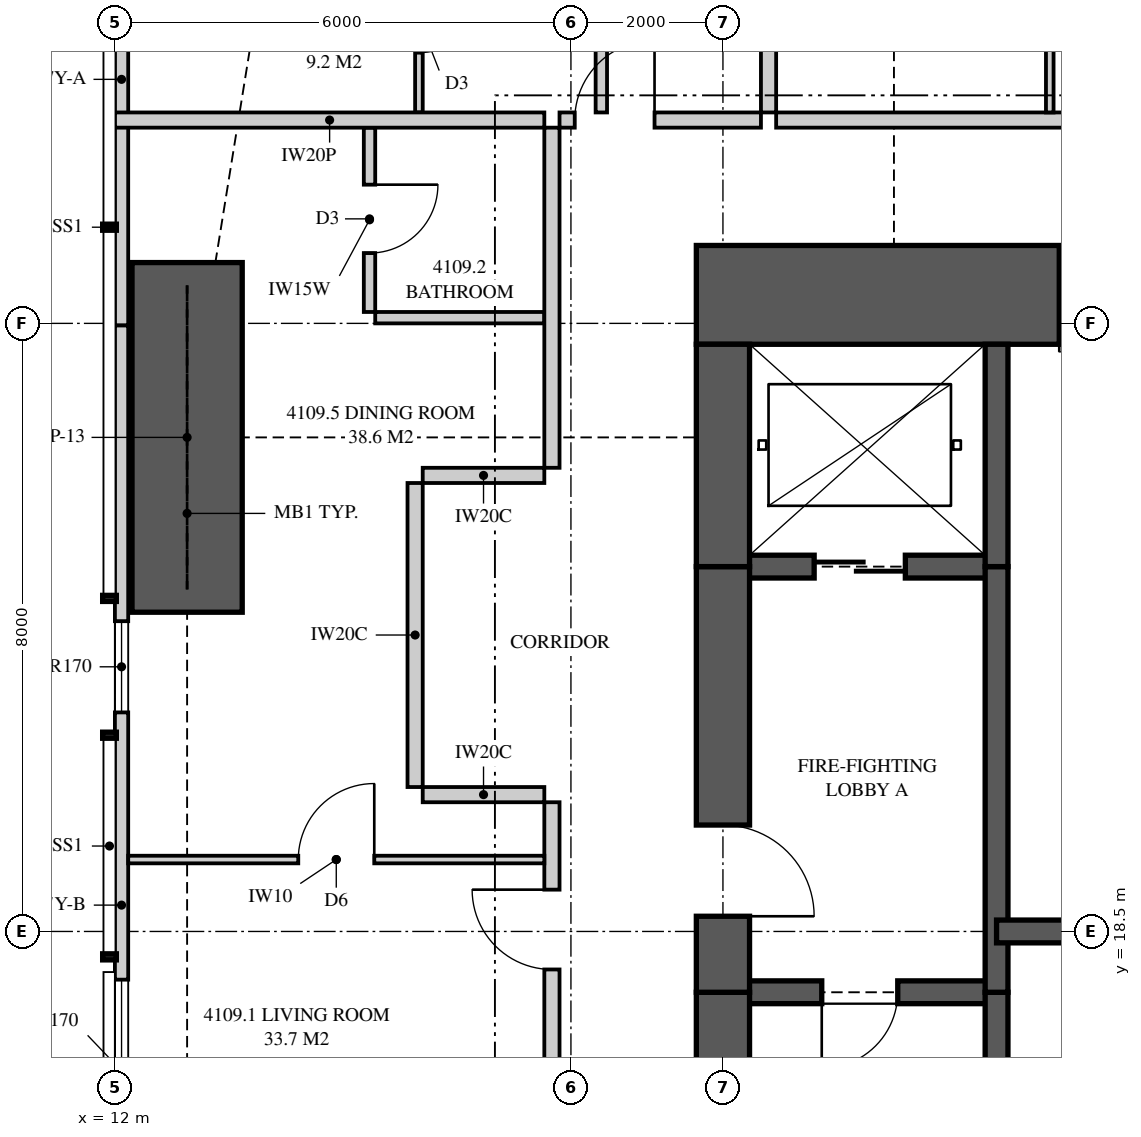
"""IFC4 building model, lengths in metres.
Left out: names, types, materials, properties, quantities, classifications, styles, units other than length and angle.
Written with IfcOpenShell. Run it as: python <this file> out.ifc"""

import sys

from ifc_helpers import new_model, si_unit, direction, frame, frame_2d, origin, place, context, subcontext, project, spatial, polyline, rectangle, outline, extrude, element, fill, save


model = new_model("IFC4")
c1 = context("Model", 3, precision=1e-05, world=origin(), true_north=direction((0.0, 1.0)))
c2 = subcontext(c1, "Body", "Model", "MODEL_VIEW")
j1 = project(units=[si_unit("LENGTHUNIT", "METRE"), si_unit("PLANEANGLEUNIT", "RADIAN")], contexts=[c1])
p1 = place(None, origin())
s1 = spatial("IfcSite", under=j1, at=p1, CompositionType="ELEMENT")
p2 = place(p1, origin())
s2 = spatial("IfcBuilding", under=s1, at=p2, CompositionType="ELEMENT")
p3 = place(p2, frame((0.0, 0.0, 154.35)))
s3 = spatial("IfcBuildingStorey", under=s2, at=p3, CompositionType="ELEMENT", Elevation=154.35)
p4 = place(p3, frame((26.0, 26.875, 0.0), z_axis=(0.0, 0.0, 1.0), x_axis=(-1.0, 0.0, 0.0)))
e1 = element("IfcWall", 1, at=p4, inside=s3, PredefinedType="SHEAR", context=c2, shape_type="SweptSolid", body=[
    extrude(rectangle(XDim=6.35, YDim=1.3, at=frame_2d((3.175, 0.0))), origin(), (0.0, 0.0, 1.0), 3.35),
])
p5 = place(p4, frame((0.825, 0.0, 0.0)))
e2 = element("IfcOpeningElement", 2, at=p5, cuts=e1, PredefinedType="OPENING", context=c2, shape_type="SweptSolid", body=[
    extrude(rectangle(XDim=0.75, YDim=2.1, at=frame_2d((0.375, 1.05))), frame((0.0, 0.66, 0.0), z_axis=(0.0, -1.0, 0.0), x_axis=(1.0, 0.0, 0.0)), (0.0, 0.0, 1.0), 1.32),
])
p6 = place(p3, frame((20.0, 26.225, 0.0), z_axis=(0.0, 0.0, 1.0), x_axis=(0.0, -1.0, 0.0)))
e3 = element("IfcWall", 3, at=p6, inside=s3, PredefinedType="SHEAR", context=c2, shape_type="SweptSolid", body=[
    extrude(rectangle(XDim=2.925, YDim=0.7, at=frame_2d((1.462, 0.0))), origin(), (0.0, 0.0, 1.0), 3.35),
])
p7 = place(p3, frame((20.0, 23.3, 0.0), z_axis=(0.0, 0.0, 1.0), x_axis=(0.0, -1.0, 0.0)))
e4 = element("IfcWall", 4, at=p7, inside=s3, PredefinedType="SHEAR", context=c2, shape_type="SweptSolid", body=[
    extrude(rectangle(XDim=5.6, YDim=0.7, at=frame_2d((2.8, 0.0))), origin(), (0.0, 0.0, 1.0), 3.35),
])
p8 = place(p7, frame((3.4, 0.0, 0.0)))
e5 = element("IfcOpeningElement", 5, at=p8, cuts=e4, PredefinedType="OPENING", context=c2, shape_type="SweptSolid", body=[
    extrude(rectangle(XDim=1.2, YDim=2.2, at=frame_2d((0.6, 1.1))), frame((0.0, 0.36, 0.0), z_axis=(0.0, -1.0, 0.0), x_axis=(1.0, 0.0, 0.0)), (0.0, 0.0, 1.0), 0.72),
])
p9 = place(p3, frame((20.0, 17.7, 0.0), z_axis=(0.0, 0.0, 1.0), x_axis=(0.0, -1.0, 0.0)))
e6 = element("IfcWall", 6, at=p9, inside=s3, PredefinedType="SHEAR", context=c2, shape_type="SweptSolid", body=[
    extrude(rectangle(XDim=4.7, YDim=0.7, at=frame_2d((2.35, 0.0))), origin(), (0.0, 0.0, 1.0), 3.35),
])
p10 = place(p3, frame((23.6, 10.775, 0.0), z_axis=(0.0, 0.0, 1.0), x_axis=(0.0, 1.0, 0.0)))
e7 = element("IfcWall", 7, at=p10, inside=s3, PredefinedType="SHEAR", context=c2, shape_type="SweptSolid", body=[
    extrude(rectangle(XDim=6.925, YDim=0.3, at=frame_2d((3.462, 0.0))), origin(), (0.0, 0.0, 1.0), 3.35),
])
p11 = place(p3, frame((23.6, 17.7, 0.0), z_axis=(0.0, 0.0, 1.0), x_axis=(0.0, 1.0, 0.0)))
e8 = element("IfcWall", 8, at=p11, inside=s3, PredefinedType="SHEAR", context=c2, shape_type="SweptSolid", body=[
    extrude(rectangle(XDim=5.6, YDim=0.3, at=frame_2d((2.8, 0.0))), origin(), (0.0, 0.0, 1.0), 3.35),
])
p12 = place(p3, frame((23.6, 23.3, 0.0), z_axis=(0.0, 0.0, 1.0), x_axis=(0.0, 1.0, 0.0)))
e9 = element("IfcWall", 9, at=p12, inside=s3, PredefinedType="SHEAR", context=c2, shape_type="SweptSolid", body=[
    extrude(rectangle(XDim=2.925, YDim=0.3, at=frame_2d((1.462, 0.0))), origin(), (0.0, 0.0, 1.0), 3.35),
])
p13 = place(p3, frame((20.0, 17.7, 0.0), z_axis=(0.0, 0.0, 1.0), x_axis=(1.0, 0.0, 0.0)))
e10 = element("IfcWall", 10, at=p13, inside=s3, PredefinedType="SHEAR", context=c2, shape_type="SweptSolid", body=[
    extrude(rectangle(XDim=3.6, YDim=0.3, at=frame_2d((1.8, 0.0))), origin(), (0.0, 0.0, 1.0), 3.35),
])
p14 = place(p13, frame((1.3, 0.0, 0.0)))
e11 = element("IfcOpeningElement", 11, at=p14, cuts=e10, PredefinedType="OPENING", context=c2, shape_type="SweptSolid", body=[
    extrude(rectangle(XDim=1.0, YDim=2.1, at=frame_2d((0.5, 1.05))), frame((0.0, 0.16, 0.0), z_axis=(0.0, -1.0, 0.0), x_axis=(1.0, 0.0, 0.0)), (0.0, 0.0, 1.0), 0.32),
])
p15 = place(p3, frame((20.0, 23.3, 0.0), z_axis=(0.0, 0.0, 1.0), x_axis=(1.0, 0.0, 0.0)))
e12 = element("IfcWall", 12, at=p15, inside=s3, PredefinedType="SHEAR", context=c2, shape_type="SweptSolid", body=[
    extrude(rectangle(XDim=3.6, YDim=0.3, at=frame_2d((1.8, 0.0))), origin(), (0.0, 0.0, 1.0), 3.35),
])
p16 = place(p15, frame((1.2, 0.0, 0.0)))
e13 = element("IfcOpeningElement", 13, at=p16, cuts=e12, PredefinedType="OPENING", context=c2, shape_type="SweptSolid", body=[
    extrude(rectangle(XDim=1.2, YDim=2.1, at=frame_2d((0.6, 1.05))), frame((0.0, 0.16, 0.0), z_axis=(0.0, -1.0, 0.0), x_axis=(1.0, 0.0, 0.0)), (0.0, 0.0, 1.0), 0.32),
])
p17 = place(p3, frame((23.6, 18.5, 0.0), z_axis=(0.0, 0.0, 1.0), x_axis=(1.0, 0.0, 0.0)))
e14 = element("IfcWall", 14, at=p17, inside=s3, PredefinedType="SHEAR", context=c2, shape_type="SweptSolid", body=[
    extrude(rectangle(XDim=2.4, YDim=0.3, at=frame_2d((1.2, 0.0))), origin(), (0.0, 0.0, 1.0), 3.35),
])
p18 = place(p3, frame((12.087, 32.949, 0.0), z_axis=(0.0, 0.0, 1.0), x_axis=(0.0, -1.0, 0.0)))
e15 = element("IfcWall", 15, at=p18, inside=s3, PredefinedType="SOLIDWALL", context=c2, shape_type="SweptSolid", body=[
    extrude(rectangle(XDim=6.477, YDim=0.175, at=frame_2d((3.238, 0.0))), origin(), (0.0, 0.0, 1.0), 3.11),
])
p19 = place(p3, frame((12.087, 26.472, 0.0), z_axis=(0.0, 0.0, 1.0), x_axis=(0.0, -1.0, 0.0)))
e16 = element("IfcWall", 16, at=p19, inside=s3, PredefinedType="SOLIDWALL", context=c2, shape_type="SweptSolid", body=[
    extrude(outline(polyline([(15.251, 2.15), (0.0, 2.15), (0.0, 0.0), (0.762, 0.0), (0.762, 0.079), (2.182, 0.079), (2.182, 0.0), (12.762, 0.0), (12.762, 0.079), (14.182, 0.079), (14.182, 0.0), (15.251, 0.0), (15.251, 2.15)])), frame((0.0, 0.087, 0.0), z_axis=(0.0, -1.0, 0.0), x_axis=(1.0, 0.0, 0.0)), (0.0, 0.0, 1.0), 0.175),
])
p20 = place(p19, frame((3.89, 0.0, 0.4)))
e17 = element("IfcOpeningElement", 17, at=p20, cuts=e16, PredefinedType="OPENING", context=c2, shape_type="SweptSolid", body=[
    extrude(rectangle(XDim=1.2, YDim=1.7, at=frame_2d((0.6, 0.85))), frame((0.0, 0.097, 0.0), z_axis=(0.0, -1.0, 0.0), x_axis=(1.0, 0.0, 0.0)), (0.0, 0.0, 1.0), 0.195),
])
p21 = place(p19, frame((8.606, 0.0, 0.4)))
e18 = element("IfcOpeningElement", 18, at=p21, cuts=e16, PredefinedType="OPENING", context=c2, shape_type="SweptSolid", body=[
    extrude(rectangle(XDim=2.4, YDim=1.7, at=frame_2d((1.2, 0.85))), frame((0.0, 0.097, 0.0), z_axis=(0.0, -1.0, 0.0), x_axis=(1.0, 0.0, 0.0)), (0.0, 0.0, 1.0), 0.195),
])
p22 = place(p3, frame((20.6, 35.825, 0.0), z_axis=(0.0, 0.0, 1.0), x_axis=(0.0, -1.0, 0.0)))
e19 = element("IfcWall", 19, at=p22, inside=s3, PredefinedType="PARTITIONING", context=c2, shape_type="SweptSolid", body=[
    extrude(outline(polyline([(0.529, 2.15), (0.0, 2.15), (0.0, 0.0), (0.529, 0.0), (0.529, 0.038), (1.021, 0.038), (1.021, 0.0), (6.55, 0.0), (6.55, 3.11), (2.194, 3.11), (2.194, 2.15), (1.021, 2.15), (1.021, 1.961), (0.529, 1.961), (0.529, 2.15)])), frame((0.0, 0.1, 0.0), z_axis=(0.0, -1.0, 0.0), x_axis=(1.0, 0.0, 0.0)), (0.0, 0.0, 1.0), 0.2),
])
p23 = place(p3, frame((17.85, 29.175, 0.0), z_axis=(0.0, 0.0, 1.0), x_axis=(1.0, 0.0, 0.0)))
e20 = element("IfcWall", 20, at=p23, inside=s3, PredefinedType="PARTITIONING", context=c2, shape_type="SweptSolid", body=[
    extrude(rectangle(XDim=2.65, YDim=0.2, at=frame_2d((1.325, 0.0))), origin(), (0.0, 0.0, 1.0), 3.11),
])
p24 = place(p23, frame((0.2, 0.0, 0.0)))
e21 = element("IfcOpeningElement", 21, at=p24, cuts=e20, PredefinedType="OPENING", context=c2, shape_type="SweptSolid", body=[
    extrude(rectangle(XDim=1.05, YDim=2.2, at=frame_2d((0.525, 1.1))), frame((0.0, 0.11, 0.0), z_axis=(0.0, -1.0, 0.0), x_axis=(1.0, 0.0, 0.0)), (0.0, 0.0, 1.0), 0.22),
])
p25 = place(p3, frame((16.0, 31.673, 0.0), z_axis=(0.0, 0.0, 1.0), x_axis=(0.0, -1.0, 0.0)))
e22 = element("IfcWall", 22, at=p25, inside=s3, PredefinedType="PARTITIONING", context=c2, shape_type="SweptSolid", body=[
    extrude(rectangle(XDim=2.398, YDim=0.1, at=frame_2d((1.199, 0.0))), origin(), (0.0, 0.0, 1.0), 3.11),
])
p26 = place(p25, frame((0.712, 0.0, 0.0)))
e23 = element("IfcOpeningElement", 23, at=p26, cuts=e22, PredefinedType="OPENING", context=c2, shape_type="SweptSolid", body=[
    extrude(rectangle(XDim=0.9, YDim=2.1, at=frame_2d((0.45, 1.05))), frame((0.0, 0.06, 0.0), z_axis=(0.0, -1.0, 0.0), x_axis=(1.0, 0.0, 0.0)), (0.0, 0.0, 1.0), 0.12),
])
p27 = place(p3, frame((18.4, 31.673, 0.0), z_axis=(0.0, 0.0, 1.0), x_axis=(0.0, -1.0, 0.0)))
e24 = element("IfcWall", 24, at=p27, inside=s3, PredefinedType="PLUMBINGWALL", context=c2, shape_type="SweptSolid", body=[
    extrude(rectangle(XDim=2.398, YDim=0.15, at=frame_2d((1.199, 0.0))), origin(), (0.0, 0.0, 1.0), 3.11),
])
p28 = place(p3, frame((20.7, 29.175, 0.0), z_axis=(0.0, 0.0, 1.0), x_axis=(1.0, 0.0, 0.0)))
e25 = element("IfcWall", 25, at=p28, inside=s3, PredefinedType="PARTITIONING", context=c2, shape_type="SweptSolid", body=[
    extrude(outline(polyline([(0.0, 0.0), (5.3, 0.0), (5.3, 3.11), (1.896, 3.11), (1.896, 2.531), (1.204, 2.531), (1.204, 3.11), (0.0, 3.11), (0.0, 0.0)])), frame((0.0, 0.1, 0.0), z_axis=(0.0, -1.0, 0.0), x_axis=(1.0, 0.0, 0.0)), (0.0, 0.0, 1.0), 0.2),
])
p29 = place(p3, frame((24.3, 32.225, 0.0), z_axis=(0.0, 0.0, 1.0), x_axis=(0.0, -1.0, 0.0)))
e26 = element("IfcWall", 26, at=p29, inside=s3, PredefinedType="PARTITIONING", context=c2, shape_type="SweptSolid", body=[
    extrude(rectangle(XDim=2.95, YDim=0.1, at=frame_2d((1.475, 0.0))), origin(), (0.0, 0.0, 1.0), 3.11),
])
p30 = place(p3, frame((12.0, 29.175, 0.0), z_axis=(0.0, 0.0, 1.0), x_axis=(1.0, 0.0, 0.0)))
e27 = element("IfcWall", 27, at=p30, inside=s3, PredefinedType="PARTITIONING", context=c2, shape_type="SweptSolid", body=[
    extrude(outline(polyline([(0.0, 0.0), (5.65, 0.0), (5.65, 3.11), (2.749, 3.11), (2.749, 2.15), (0.5, 2.15), (0.5, 3.11), (0.0, 3.11), (0.0, 0.0)])), frame((0.0, 0.1, 0.0), z_axis=(0.0, -1.0, 0.0), x_axis=(1.0, 0.0, 0.0)), (0.0, 0.0, 1.0), 0.2),
])
p31 = place(p3, frame((17.75, 7.925, 0.0), z_axis=(0.0, 0.0, 1.0), x_axis=(0.0, 1.0, 0.0)))
e28 = element("IfcWall", 28, at=p31, inside=s3, PredefinedType="PARTITIONING", context=c2, shape_type="SweptSolid", body=[
    extrude(outline(polyline([(0.0, 0.0), (12.275, 0.0), (12.275, 3.11), (5.421, 3.11), (5.421, 2.531), (4.729, 2.531), (4.729, 3.11), (0.0, 3.11), (0.0, 0.0)])), frame((0.0, 0.1, 0.0), z_axis=(0.0, -1.0, 0.0), x_axis=(1.0, 0.0, 0.0)), (0.0, 0.0, 1.0), 0.2),
])
p32 = place(p31, frame((10.075, 0.0, 0.0)))
e29 = element("IfcOpeningElement", 29, at=p32, cuts=e28, PredefinedType="OPENING", context=c2, shape_type="SweptSolid", body=[
    extrude(rectangle(XDim=1.05, YDim=2.2, at=frame_2d((0.525, 1.1))), frame((0.0, 0.11, 0.0), z_axis=(0.0, -1.0, 0.0), x_axis=(1.0, 0.0, 0.0)), (0.0, 0.0, 1.0), 0.22),
])
p33 = place(p3, frame((15.35, 26.65, 0.0), z_axis=(0.0, 0.0, 1.0), x_axis=(0.0, 1.0, 0.0)))
e30 = element("IfcWall", 30, at=p33, inside=s3, PredefinedType="PLUMBINGWALL", context=c2, shape_type="SweptSolid", body=[
    extrude(rectangle(XDim=2.425, YDim=0.15, at=frame_2d((1.212, 0.0))), origin(), (0.0, 0.0, 1.0), 3.11),
])
p34 = place(p33, frame((0.775, 0.0, 0.0)))
e31 = element("IfcOpeningElement", 31, at=p34, cuts=e30, PredefinedType="OPENING", context=c2, shape_type="SweptSolid", body=[
    extrude(rectangle(XDim=0.9, YDim=2.1, at=frame_2d((0.45, 1.05))), frame((0.0, 0.085, 0.0), z_axis=(0.0, -1.0, 0.0), x_axis=(1.0, 0.0, 0.0)), (0.0, 0.0, 1.0), 0.17),
])
p35 = place(p3, frame((15.425, 26.575, 0.0), z_axis=(0.0, 0.0, 1.0), x_axis=(1.0, 0.0, 0.0)))
e32 = element("IfcWall", 32, at=p35, inside=s3, PredefinedType="PLUMBINGWALL", context=c2, shape_type="SweptSolid", body=[
    extrude(rectangle(XDim=2.225, YDim=0.15, at=frame_2d((1.112, 0.0))), origin(), (0.0, 0.0, 1.0), 3.11),
])
p36 = place(p3, frame((12.175, 19.446, 0.0), z_axis=(0.0, 0.0, 1.0), x_axis=(1.0, 0.0, 0.0)))
e33 = element("IfcWall", 33, at=p36, inside=s3, PredefinedType="PARTITIONING", context=c2, shape_type="SweptSolid", body=[
    extrude(outline(polyline([(0.0, 0.0), (5.475, 0.0), (5.475, 3.11), (1.835, 3.11), (1.835, 2.15), (0.0, 2.15), (0.0, 3.11), (0.0, 0.0)])), frame((0.0, 0.05, 0.0), z_axis=(0.0, -1.0, 0.0), x_axis=(1.0, 0.0, 0.0)), (0.0, 0.0, 1.0), 0.1),
])
p37 = place(p36, frame((2.238, 0.0, 0.0)))
e34 = element("IfcOpeningElement", 34, at=p37, cuts=e33, PredefinedType="OPENING", context=c2, shape_type="SweptSolid", body=[
    extrude(rectangle(XDim=1.0, YDim=2.1, at=frame_2d((0.5, 1.05))), frame((0.0, 0.06, 0.0), z_axis=(0.0, -1.0, 0.0), x_axis=(1.0, 0.0, 0.0)), (0.0, 0.0, 1.0), 0.12),
])
p38 = place(p3, frame((17.75, 24.6, 0.0), z_axis=(0.0, 0.0, 1.0), x_axis=(0.0, 1.0, 0.0)))
e35 = element("IfcWall", 35, at=p38, inside=s3, PredefinedType="PARTITIONING", context=c2, shape_type="SweptSolid", body=[
    extrude(outline(polyline([(0.0, 0.0), (4.475, 0.0), (4.475, 3.11), (0.746, 3.11), (0.746, 2.531), (0.054, 2.531), (0.054, 3.11), (0.0, 3.11), (0.0, 0.0)])), frame((0.0, 0.1, 0.0), z_axis=(0.0, -1.0, 0.0), x_axis=(1.0, 0.0, 0.0)), (0.0, 0.0, 1.0), 0.2),
])
p39 = place(p3, frame((15.95, 20.4, 0.0), z_axis=(0.0, 0.0, 1.0), x_axis=(0.0, 1.0, 0.0)))
e36 = element("IfcWall", 36, at=p39, inside=s3, PredefinedType="PARTITIONING", context=c2, shape_type="SweptSolid", body=[
    extrude(rectangle(XDim=4.0, YDim=0.2, at=frame_2d((2.0, 0.0))), origin(), (0.0, 0.0, 1.0), 3.11),
])
for number, where, z_axis, x_axis in (
    (37, (17.65, 20.3, 0.0), (0.0, 0.0, 1.0), (-1.0, 0.0, 0.0)),
    (38, (17.65, 24.5, 0.0), (0.0, 0.0, 1.0), (-1.0, 0.0, 0.0)),
):
    element("IfcWall", number, at=place(p3, frame(where, z_axis=z_axis, x_axis=x_axis)), inside=s3, PredefinedType="PARTITIONING", context=c2, shape_type="SweptSolid", body=[
        extrude(rectangle(XDim=1.6, YDim=0.2, at=frame_2d((0.8, 0.0))), origin(), (0.0, 0.0, 1.0), 3.11),
    ])
p40 = place(p3, frame((12.95, 22.7, 0.0), z_axis=(0.0, 0.0, 1.0), x_axis=(0.0, 1.0, 0.0)))
e39 = element("IfcWall", 39, at=p40, inside=s3, PredefinedType="SHEAR", context=c2, shape_type="SweptSolid", body=[
    extrude(rectangle(XDim=4.6, YDim=1.45, at=frame_2d((2.3, 0.0))), origin(), (0.0, 0.0, 1.0), 3.35),
])
p41 = place(p20, origin())
e40 = element("IfcWindow", 40, at=p41, inside=s3, PartitioningType="SINGLE_PANEL", PredefinedType="WINDOW", context=c2, shape_type="SweptSolid", body=[
    extrude(rectangle(XDim=1.2, YDim=1.7, at=frame_2d((0.6, 0.85))), frame((0.0, 0.03, 0.0), z_axis=(0.0, -1.0, 0.0), x_axis=(1.0, 0.0, 0.0)), (0.0, 0.0, 1.0), 0.06),
])
fill(e17, e40)
p42 = place(p21, origin())
e41 = element("IfcWindow", 41, at=p42, inside=s3, PartitioningType="SINGLE_PANEL", PredefinedType="WINDOW", context=c2, shape_type="SweptSolid", body=[
    extrude(rectangle(XDim=2.4, YDim=1.7, at=frame_2d((1.2, 0.85))), frame((0.0, 0.03, 0.0), z_axis=(0.0, -1.0, 0.0), x_axis=(1.0, 0.0, 0.0)), (0.0, 0.0, 1.0), 0.06),
])
fill(e18, e41)
p43 = place(p24, origin())
e42 = element("IfcDoor", 42, at=p43, inside=s3, OperationType="SINGLE_SWING_RIGHT", PredefinedType="DOOR", context=c2, shape_type="SweptSolid", body=[
    extrude(rectangle(XDim=1.05, YDim=2.2, at=frame_2d((0.525, 1.1))), frame((0.0, 0.025, 0.0), z_axis=(0.0, -1.0, 0.0), x_axis=(1.0, 0.0, 0.0)), (0.0, 0.0, 1.0), 0.05),
])
fill(e21, e42)
p44 = place(p26, origin())
e43 = element("IfcDoor", 43, at=p44, inside=s3, OperationType="SINGLE_SWING_LEFT", PredefinedType="DOOR", context=c2, shape_type="SweptSolid", body=[
    extrude(rectangle(XDim=0.9, YDim=2.1, at=frame_2d((0.45, 1.05))), frame((0.0, 0.025, 0.0), z_axis=(0.0, -1.0, 0.0), x_axis=(1.0, 0.0, 0.0)), (0.0, 0.0, 1.0), 0.05),
])
fill(e23, e43)
p45 = place(p32, origin())
e44 = element("IfcDoor", 44, at=p45, inside=s3, OperationType="SINGLE_SWING_RIGHT", PredefinedType="DOOR", context=c2, shape_type="SweptSolid", body=[
    extrude(rectangle(XDim=1.05, YDim=2.2, at=frame_2d((0.525, 1.1))), frame((0.0, 0.025, 0.0), z_axis=(0.0, -1.0, 0.0), x_axis=(1.0, 0.0, 0.0)), (0.0, 0.0, 1.0), 0.05),
])
fill(e29, e44)
p46 = place(p34, frame((0.9, 0.0, 0.0), z_axis=(0.0, 0.0, 1.0), x_axis=(-1.0, 0.0, 0.0)))
e45 = element("IfcDoor", 45, at=p46, inside=s3, OperationType="SINGLE_SWING_LEFT", PredefinedType="DOOR", context=c2, shape_type="SweptSolid", body=[
    extrude(rectangle(XDim=0.9, YDim=2.1, at=frame_2d((0.45, 1.05))), frame((0.0, 0.025, 0.0), z_axis=(0.0, -1.0, 0.0), x_axis=(1.0, 0.0, 0.0)), (0.0, 0.0, 1.0), 0.05),
])
fill(e31, e45)
p47 = place(p37, origin())
e46 = element("IfcDoor", 46, at=p47, inside=s3, OperationType="SINGLE_SWING_RIGHT", PredefinedType="DOOR", context=c2, shape_type="SweptSolid", body=[
    extrude(rectangle(XDim=1.0, YDim=2.1, at=frame_2d((0.5, 1.05))), frame((0.0, 0.025, 0.0), z_axis=(0.0, -1.0, 0.0), x_axis=(1.0, 0.0, 0.0)), (0.0, 0.0, 1.0), 0.05),
])
fill(e34, e46)
p48 = place(p14, frame((1.0, 0.0, 0.0), z_axis=(0.0, 0.0, 1.0), x_axis=(-1.0, 0.0, 0.0)))
e47 = element("IfcDoor", 47, at=p48, inside=s3, OperationType="SINGLE_SWING_RIGHT", PredefinedType="DOOR", context=c2, shape_type="SweptSolid", body=[
    extrude(rectangle(XDim=1.0, YDim=2.1, at=frame_2d((0.5, 1.05))), frame((0.0, 0.025, 0.0), z_axis=(0.0, -1.0, 0.0), x_axis=(1.0, 0.0, 0.0)), (0.0, 0.0, 1.0), 0.05),
])
fill(e11, e47)
p49 = place(p8, origin())
e48 = element("IfcDoor", 48, at=p49, inside=s3, OperationType="SINGLE_SWING_RIGHT", PredefinedType="DOOR", context=c2, shape_type="SweptSolid", body=[
    extrude(rectangle(XDim=1.2, YDim=2.2, at=frame_2d((0.6, 1.1))), frame((0.0, 0.025, 0.0), z_axis=(0.0, -1.0, 0.0), x_axis=(1.0, 0.0, 0.0)), (0.0, 0.0, 1.0), 0.05),
])
fill(e5, e48)
p50 = place(p16, origin())
e49 = element("IfcDoor", 49, at=p50, inside=s3, OperationType="SLIDING_TO_LEFT", PredefinedType="DOOR", context=c2, shape_type="SweptSolid", body=[
    extrude(rectangle(XDim=1.2, YDim=2.1, at=frame_2d((0.6, 1.05))), frame((0.0, 0.025, 0.0), z_axis=(0.0, -1.0, 0.0), x_axis=(1.0, 0.0, 0.0)), (0.0, 0.0, 1.0), 0.05),
])
fill(e13, e49)
p51 = place(p5, origin())
e50 = element("IfcDoor", 50, at=p51, inside=s3, OperationType="SINGLE_SWING_RIGHT", PredefinedType="DOOR", context=c2, shape_type="SweptSolid", body=[
    extrude(rectangle(XDim=0.75, YDim=2.1, at=frame_2d((0.375, 1.05))), frame((0.0, 0.025, 0.0), z_axis=(0.0, -1.0, 0.0), x_axis=(1.0, 0.0, 0.0)), (0.0, 0.0, 1.0), 0.05),
])
fill(e2, e50)
save(model, sys.argv[1])
